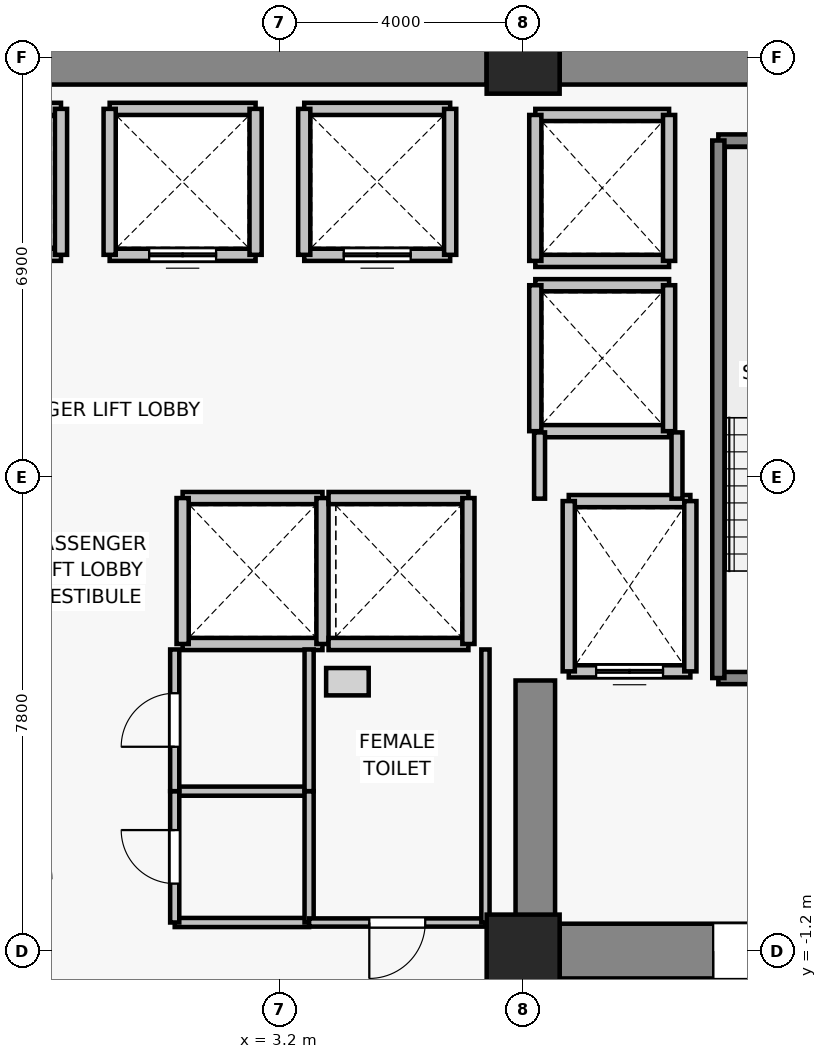
"""IFC4 building model, lengths in metres.
Left out: names, types, materials, properties, quantities, classifications, styles, units other than length and angle.
Written with IfcOpenShell. Run it as: python <this file> out.ifc"""

import sys

from ifc_helpers import new_model, si_unit, direction, frame, frame_2d, origin, origin_2d, place, context, subcontext, project, spatial, rectangle, extrude, source, transform, mapped, element, fill, save


model = new_model("IFC4")
c1 = context("Model", 3, precision=1e-05, world=origin(), true_north=direction((0.0, 1.0)))
c2 = subcontext(c1, "Body", "Model", "MODEL_VIEW")
j1 = project(units=[si_unit("LENGTHUNIT", "METRE"), si_unit("PLANEANGLEUNIT", "RADIAN")], contexts=[c1])
p1 = place(None, origin())
s1 = spatial("IfcSite", under=j1, at=p1, CompositionType="ELEMENT")
p2 = place(p1, origin())
s2 = spatial("IfcBuilding", under=s1, at=p2, CompositionType="ELEMENT")
p3 = place(p2, frame((0.0, 0.0, 70.3)))
s3 = spatial("IfcBuildingStorey", under=s2, at=p3, CompositionType="ELEMENT", Elevation=70.3)
for number, where, z_axis, x_axis in (
    (1, (7.2, -1.2, 0.0), (0.0, 0.0, 1.0), (1.0, 0.0, 0.0)),
    (2, (7.2, 13.5, 0.0), (0.0, 0.0, 1.0), (1.0, 0.0, 0.0)),
):
    element("IfcColumn", number, at=place(p3, frame(where, z_axis=z_axis, x_axis=x_axis)), inside=s3, PredefinedType="COLUMN", context=c2, shape_type="SweptSolid", body=[
        extrude(rectangle(XDim=1.2, YDim=1.2, at=origin_2d()), origin(), (0.0, 0.0, 1.0), 3.3),
    ])
p4 = place(p3, frame((-6.6, 13.5, 0.0), z_axis=(0.0, 0.0, 1.0), x_axis=(1.0, 0.0, 0.0)))
e3 = element("IfcWall", 3, at=p4, inside=s3, PredefinedType="SHEAR", context=c2, shape_type="SweptSolid", body=[
    extrude(rectangle(XDim=13.2, YDim=0.9, at=frame_2d((6.6, 0.0))), origin(), (0.0, 0.0, 1.0), 3.075),
])
p5 = place(p3, frame((7.8, 13.5, 0.0), z_axis=(0.0, 0.0, 1.0), x_axis=(1.0, 0.0, 0.0)))
e4 = element("IfcWall", 4, at=p5, inside=s3, PredefinedType="SHEAR", context=c2, shape_type="SweptSolid", body=[
    extrude(rectangle(XDim=6.0, YDim=0.9, at=frame_2d((3.0, 0.0))), origin(), (0.0, 0.0, 1.0), 3.075),
])
p6 = place(p3, frame((13.8, -1.2, 0.0), z_axis=(0.0, 0.0, 1.0), x_axis=(-1.0, 0.0, 0.0)))
e5 = element("IfcWall", 5, at=p6, inside=s3, PredefinedType="SHEAR", context=c2, shape_type="SweptSolid", body=[
    extrude(rectangle(XDim=6.0, YDim=0.9, at=frame_2d((3.0, 0.0))), origin(), (0.0, 0.0, 1.0), 3.075),
])
p7 = place(p6, frame((2.325, 0.0, 0.0)))
e6 = element("IfcOpeningElement", 6, at=p7, cuts=e5, PredefinedType="OPENING", context=c2, shape_type="SweptSolid", body=[
    extrude(rectangle(XDim=1.15, YDim=2.15, at=frame_2d((0.575, 1.075))), frame((0.0, 0.46, 0.0), z_axis=(0.0, -1.0, 0.0), x_axis=(1.0, 0.0, 0.0)), (0.0, 0.0, 1.0), 0.92),
])
p8 = place(p3, frame((7.4, -0.75, 0.0), z_axis=(0.0, 0.0, 1.0), x_axis=(0.0, 1.0, 0.0)))
e7 = element("IfcWall", 7, at=p8, inside=s3, PredefinedType="SHEAR", context=c2, shape_type="SweptSolid", body=[
    extrude(rectangle(XDim=4.0, YDim=0.65, at=frame_2d((2.0, 0.0))), origin(), (0.0, 0.0, 1.0), 3.075),
])
p9 = place(p3, frame((9.95, 3.4, 0.0), z_axis=(0.0, 0.0, 1.0), x_axis=(-1.0, 0.0, 0.0)))
e8 = element("IfcWall", 8, at=p9, inside=s3, PredefinedType="SOLIDWALL", context=c2, shape_type="SweptSolid", body=[
    extrude(rectangle(XDim=2.0, YDim=0.2, at=frame_2d((1.0, 0.0))), origin(), (0.0, 0.0, 1.0), 3.075),
])
p10 = place(p9, frame((0.45, 0.0, 0.0)))
e9 = element("IfcOpeningElement", 9, at=p10, cuts=e8, PredefinedType="OPENING", context=c2, shape_type="SweptSolid", body=[
    extrude(rectangle(XDim=1.1, YDim=2.2, at=frame_2d((0.55, 1.1))), frame((0.0, 0.11, 0.0), z_axis=(0.0, -1.0, 0.0), x_axis=(1.0, 0.0, 0.0)), (0.0, 0.0, 1.0), 0.22),
])
p11 = place(p3, frame((7.95, 6.2, 0.0), z_axis=(0.0, 0.0, 1.0), x_axis=(1.0, 0.0, 0.0)))
e10 = element("IfcWall", 10, at=p11, inside=s3, PredefinedType="SOLIDWALL", context=c2, shape_type="SweptSolid", body=[
    extrude(rectangle(XDim=2.0, YDim=0.2, at=frame_2d((1.0, 0.0))), origin(), (0.0, 0.0, 1.0), 3.075),
])
for number, where, z_axis, x_axis in (
    (11, (7.95, 3.4, 0.0), (0.0, 0.0, 1.0), (0.0, 1.0, 0.0)),
    (12, (9.95, 6.2, 0.0), (0.0, 0.0, 1.0), (0.0, -1.0, 0.0)),
):
    element("IfcWall", number, at=place(p3, frame(where, z_axis=z_axis, x_axis=x_axis)), inside=s3, PredefinedType="SOLIDWALL", context=c2, shape_type="SweptSolid", body=[
        extrude(rectangle(XDim=2.8, YDim=0.2, at=frame_2d((1.4, 0.0))), origin(), (0.0, 0.0, 1.0), 3.075),
    ])
p12 = place(p3, frame((-0.4, 10.25, 0.0), z_axis=(0.0, 0.0, 1.0), x_axis=(-1.0, 0.0, 0.0)))
e13 = element("IfcWall", 13, at=p12, inside=s3, PredefinedType="SOLIDWALL", context=c2, shape_type="SweptSolid", body=[
    extrude(rectangle(XDim=2.4, YDim=0.2, at=frame_2d((1.2, 0.0))), origin(), (0.0, 0.0, 1.0), 3.075),
])
p13 = place(p12, frame((0.65, 0.0, 0.0)))
e14 = element("IfcOpeningElement", 14, at=p13, cuts=e13, PredefinedType="OPENING", context=c2, shape_type="SweptSolid", body=[
    extrude(rectangle(XDim=1.1, YDim=2.2, at=frame_2d((0.55, 1.1))), frame((0.0, 0.11, 0.0), z_axis=(0.0, -1.0, 0.0), x_axis=(1.0, 0.0, 0.0)), (0.0, 0.0, 1.0), 0.22),
])
p14 = place(p3, frame((-2.8, 12.65, 0.0), z_axis=(0.0, 0.0, 1.0), x_axis=(1.0, 0.0, 0.0)))
e15 = element("IfcWall", 15, at=p14, inside=s3, PredefinedType="SOLIDWALL", context=c2, shape_type="SweptSolid", body=[
    extrude(rectangle(XDim=2.4, YDim=0.2, at=frame_2d((1.2, 0.0))), origin(), (0.0, 0.0, 1.0), 3.075),
])
p15 = place(p3, frame((-0.4, 12.65, 0.0), z_axis=(0.0, 0.0, 1.0), x_axis=(0.0, -1.0, 0.0)))
e16 = element("IfcWall", 16, at=p15, inside=s3, PredefinedType="SOLIDWALL", context=c2, shape_type="SweptSolid", body=[
    extrude(rectangle(XDim=2.4, YDim=0.2, at=frame_2d((1.2, 0.0))), origin(), (0.0, 0.0, 1.0), 3.075),
])
p16 = place(p3, frame((2.8, 10.25, 0.0), z_axis=(0.0, 0.0, 1.0), x_axis=(-1.0, 0.0, 0.0)))
e17 = element("IfcWall", 17, at=p16, inside=s3, PredefinedType="SOLIDWALL", context=c2, shape_type="SweptSolid", body=[
    extrude(rectangle(XDim=2.4, YDim=0.2, at=frame_2d((1.2, 0.0))), origin(), (0.0, 0.0, 1.0), 3.075),
])
p17 = place(p16, frame((0.65, 0.0, 0.0)))
e18 = element("IfcOpeningElement", 18, at=p17, cuts=e17, PredefinedType="OPENING", context=c2, shape_type="SweptSolid", body=[
    extrude(rectangle(XDim=1.1, YDim=2.2, at=frame_2d((0.55, 1.1))), frame((0.0, 0.11, 0.0), z_axis=(0.0, -1.0, 0.0), x_axis=(1.0, 0.0, 0.0)), (0.0, 0.0, 1.0), 0.22),
])
p18 = place(p3, frame((0.4, 12.65, 0.0), z_axis=(0.0, 0.0, 1.0), x_axis=(1.0, 0.0, 0.0)))
e19 = element("IfcWall", 19, at=p18, inside=s3, PredefinedType="SOLIDWALL", context=c2, shape_type="SweptSolid", body=[
    extrude(rectangle(XDim=2.4, YDim=0.2, at=frame_2d((1.2, 0.0))), origin(), (0.0, 0.0, 1.0), 3.075),
])
for number, where, z_axis, x_axis in (
    (20, (0.4, 10.25, 0.0), (0.0, 0.0, 1.0), (0.0, 1.0, 0.0)),
    (21, (2.8, 12.65, 0.0), (0.0, 0.0, 1.0), (0.0, -1.0, 0.0)),
):
    element("IfcWall", number, at=place(p3, frame(where, z_axis=z_axis, x_axis=x_axis)), inside=s3, PredefinedType="SOLIDWALL", context=c2, shape_type="SweptSolid", body=[
        extrude(rectangle(XDim=2.4, YDim=0.2, at=frame_2d((1.2, 0.0))), origin(), (0.0, 0.0, 1.0), 3.075),
    ])
p19 = place(p3, frame((6.0, 10.25, 0.0), z_axis=(0.0, 0.0, 1.0), x_axis=(-1.0, 0.0, 0.0)))
e22 = element("IfcWall", 22, at=p19, inside=s3, PredefinedType="SOLIDWALL", context=c2, shape_type="SweptSolid", body=[
    extrude(rectangle(XDim=2.4, YDim=0.2, at=frame_2d((1.2, 0.0))), origin(), (0.0, 0.0, 1.0), 3.075),
])
p20 = place(p19, frame((0.65, 0.0, 0.0)))
e23 = element("IfcOpeningElement", 23, at=p20, cuts=e22, PredefinedType="OPENING", context=c2, shape_type="SweptSolid", body=[
    extrude(rectangle(XDim=1.1, YDim=2.2, at=frame_2d((0.55, 1.1))), frame((0.0, 0.11, 0.0), z_axis=(0.0, -1.0, 0.0), x_axis=(1.0, 0.0, 0.0)), (0.0, 0.0, 1.0), 0.22),
])
for number, where, z_axis, x_axis in (
    (24, (3.6, 12.65, 0.0), (0.0, 0.0, 1.0), (1.0, 0.0, 0.0)),
    (25, (3.6, 10.25, 0.0), (0.0, 0.0, 1.0), (0.0, 1.0, 0.0)),
    (26, (6.0, 12.65, 0.0), (0.0, 0.0, 1.0), (0.0, -1.0, 0.0)),
):
    element("IfcWall", number, at=place(p3, frame(where, z_axis=z_axis, x_axis=x_axis)), inside=s3, PredefinedType="SOLIDWALL", context=c2, shape_type="SweptSolid", body=[
        extrude(rectangle(XDim=2.4, YDim=0.2, at=frame_2d((1.2, 0.0))), origin(), (0.0, 0.0, 1.0), 3.075),
    ])
for number, where, z_axis, x_axis in (
    (27, (3.9, 3.85, 0.0), (0.0, 0.0, 1.0), (-1.0, 0.0, 0.0)),
    (28, (1.6, 6.25, 0.0), (0.0, 0.0, 1.0), (1.0, 0.0, 0.0)),
):
    element("IfcWall", number, at=place(p3, frame(where, z_axis=z_axis, x_axis=x_axis)), inside=s3, PredefinedType="SOLIDWALL", context=c2, shape_type="SweptSolid", body=[
        extrude(rectangle(XDim=2.3, YDim=0.2, at=frame_2d((1.15, 0.0))), origin(), (0.0, 0.0, 1.0), 3.075),
    ])
for number, where, z_axis, x_axis in (
    (29, (1.6, 3.85, 0.0), (0.0, 0.0, 1.0), (0.0, 1.0, 0.0)),
    (30, (3.9, 6.25, 0.0), (0.0, 0.0, 1.0), (0.0, -1.0, 0.0)),
):
    element("IfcWall", number, at=place(p3, frame(where, z_axis=z_axis, x_axis=x_axis)), inside=s3, PredefinedType="SOLIDWALL", context=c2, shape_type="SweptSolid", body=[
        extrude(rectangle(XDim=2.4, YDim=0.2, at=frame_2d((1.2, 0.0))), origin(), (0.0, 0.0, 1.0), 3.075),
    ])
for number, where, z_axis, x_axis in (
    (31, (6.3, 3.85, 0.0), (0.0, 0.0, 1.0), (-1.0, 0.0, 0.0)),
    (32, (4.0, 6.25, 0.0), (0.0, 0.0, 1.0), (1.0, 0.0, 0.0)),
):
    element("IfcWall", number, at=place(p3, frame(where, z_axis=z_axis, x_axis=x_axis)), inside=s3, PredefinedType="SOLIDWALL", context=c2, shape_type="SweptSolid", body=[
        extrude(rectangle(XDim=2.3, YDim=0.2, at=frame_2d((1.15, 0.0))), origin(), (0.0, 0.0, 1.0), 3.075),
    ])
p21 = place(p3, frame((6.3, 6.25, 0.0), z_axis=(0.0, 0.0, 1.0), x_axis=(0.0, -1.0, 0.0)))
e33 = element("IfcWall", 33, at=p21, inside=s3, PredefinedType="SOLIDWALL", context=c2, shape_type="SweptSolid", body=[
    extrude(rectangle(XDim=2.4, YDim=0.2, at=frame_2d((1.2, 0.0))), origin(), (0.0, 0.0, 1.0), 3.075),
])
for number, where, z_axis, x_axis in (
    (34, (9.6, 7.35, 0.0), (0.0, 0.0, 1.0), (-1.0, 0.0, 0.0)),
    (35, (7.4, 9.75, 0.0), (0.0, 0.0, 1.0), (1.0, 0.0, 0.0)),
):
    element("IfcWall", number, at=place(p3, frame(where, z_axis=z_axis, x_axis=x_axis)), inside=s3, PredefinedType="SOLIDWALL", context=c2, shape_type="SweptSolid", body=[
        extrude(rectangle(XDim=2.2, YDim=0.2, at=frame_2d((1.1, 0.0))), origin(), (0.0, 0.0, 1.0), 2.465),
    ])
p22 = place(p3, frame((7.4, 7.35, 0.0), z_axis=(0.0, 0.0, 1.0), x_axis=(0.0, 1.0, 0.0)))
e36 = element("IfcWall", 36, at=p22, inside=s3, PredefinedType="SOLIDWALL", context=c2, shape_type="SweptSolid", body=[
    extrude(rectangle(XDim=2.4, YDim=0.2, at=frame_2d((1.2, 0.0))), origin(), (0.0, 0.0, 1.0), 2.465),
])
p23 = place(p3, frame((9.6, 9.75, 0.0), z_axis=(0.0, 0.0, 1.0), x_axis=(0.0, -1.0, 0.0)))
e37 = element("IfcWall", 37, at=p23, inside=s3, PredefinedType="SOLIDWALL", context=c2, shape_type="SweptSolid", body=[
    extrude(rectangle(XDim=2.4, YDim=0.2, at=frame_2d((1.2, 0.0))), origin(), (0.0, 0.0, 1.0), 3.075),
])
for number, where, z_axis, x_axis in (
    (38, (9.6, 10.15, 0.0), (0.0, 0.0, 1.0), (-1.0, 0.0, 0.0)),
    (39, (7.4, 12.55, 0.0), (0.0, 0.0, 1.0), (1.0, 0.0, 0.0)),
):
    element("IfcWall", number, at=place(p3, frame(where, z_axis=z_axis, x_axis=x_axis)), inside=s3, PredefinedType="SOLIDWALL", context=c2, shape_type="SweptSolid", body=[
        extrude(rectangle(XDim=2.2, YDim=0.2, at=frame_2d((1.1, 0.0))), origin(), (0.0, 0.0, 1.0), 2.465),
    ])
p24 = place(p3, frame((7.4, 10.15, 0.0), z_axis=(0.0, 0.0, 1.0), x_axis=(0.0, 1.0, 0.0)))
e40 = element("IfcWall", 40, at=p24, inside=s3, PredefinedType="SOLIDWALL", context=c2, shape_type="SweptSolid", body=[
    extrude(rectangle(XDim=2.4, YDim=0.2, at=frame_2d((1.2, 0.0))), origin(), (0.0, 0.0, 1.0), 2.465),
])
p25 = place(p3, frame((9.6, 12.55, 0.0), z_axis=(0.0, 0.0, 1.0), x_axis=(0.0, -1.0, 0.0)))
e41 = element("IfcWall", 41, at=p25, inside=s3, PredefinedType="SOLIDWALL", context=c2, shape_type="SweptSolid", body=[
    extrude(rectangle(XDim=2.4, YDim=0.2, at=frame_2d((1.2, 0.0))), origin(), (0.0, 0.0, 1.0), 3.075),
])
p26 = place(p3, frame((13.93, 3.29, 0.0), z_axis=(0.0, 0.0, 1.0), x_axis=(-1.0, 0.0, 0.0)))
e42 = element("IfcWall", 42, at=p26, inside=s3, PredefinedType="SOLIDWALL", context=c2, shape_type="SweptSolid", body=[
    extrude(rectangle(XDim=3.52, YDim=0.2, at=frame_2d((1.76, 0.0))), origin(), (0.0, 0.0, 1.0), 3.075),
])
p27 = place(p26, frame((1.205, 0.0, 0.0)))
e43 = element("IfcOpeningElement", 43, at=p27, cuts=e42, PredefinedType="OPENING", context=c2, shape_type="SweptSolid", body=[
    extrude(rectangle(XDim=1.15, YDim=2.15, at=frame_2d((0.575, 1.075))), frame((0.0, 0.11, 0.0), z_axis=(0.0, -1.0, 0.0), x_axis=(1.0, 0.0, 0.0)), (0.0, 0.0, 1.0), 0.22),
])
p28 = place(p3, frame((10.41, 12.13, 0.0), z_axis=(0.0, 0.0, 1.0), x_axis=(1.0, 0.0, 0.0)))
e44 = element("IfcWall", 44, at=p28, inside=s3, PredefinedType="SOLIDWALL", context=c2, shape_type="SweptSolid", body=[
    extrude(rectangle(XDim=3.52, YDim=0.2, at=frame_2d((1.76, 0.0))), origin(), (0.0, 0.0, 1.0), 3.075),
])
p29 = place(p3, frame((10.41, 3.29, 0.0), z_axis=(0.0, 0.0, 1.0), x_axis=(0.0, 1.0, 0.0)))
e45 = element("IfcWall", 45, at=p29, inside=s3, PredefinedType="SOLIDWALL", context=c2, shape_type="SweptSolid", body=[
    extrude(rectangle(XDim=8.84, YDim=0.2, at=frame_2d((4.42, 0.0))), origin(), (0.0, 0.0, 1.0), 3.075),
])
p30 = place(p3, frame((7.47, 6.24, 0.0), z_axis=(0.0, 0.0, 1.0), x_axis=(0.0, 1.0, 0.0)))
e46 = element("IfcWall", 46, at=p30, inside=s3, PredefinedType="PARTITIONING", context=c2, shape_type="SweptSolid", body=[
    extrude(rectangle(XDim=1.09, YDim=0.18, at=frame_2d((0.545, 0.0))), origin(), (0.0, 0.0, 1.0), 2.465),
])
p31 = place(p3, frame((9.73, 7.33, 0.0), z_axis=(0.0, 0.0, 1.0), x_axis=(0.0, -1.0, 0.0)))
e47 = element("IfcWall", 47, at=p31, inside=s3, PredefinedType="PARTITIONING", context=c2, shape_type="SweptSolid", body=[
    extrude(rectangle(XDim=1.09, YDim=0.18, at=frame_2d((0.545, 0.0))), origin(), (0.0, 0.0, 1.0), 3.075),
])
for number, where, z_axis, x_axis in (
    (48, (3.68, -0.73, 0.0), (0.0, 0.0, 1.0), (-1.0, 0.0, 0.0)),
    (49, (1.47, 1.43, 0.0), (0.0, 0.0, 1.0), (1.0, 0.0, 0.0)),
):
    element("IfcWall", number, at=place(p3, frame(where, z_axis=z_axis, x_axis=x_axis)), inside=s3, PredefinedType="PARTITIONING", context=c2, shape_type="SweptSolid", body=[
        extrude(rectangle(XDim=2.21, YDim=0.15, at=frame_2d((1.105, 0.0))), origin(), (0.0, 0.0, 1.0), 3.075),
    ])
p32 = place(p3, frame((1.47, -0.73, 0.0), z_axis=(0.0, 0.0, 1.0), x_axis=(0.0, 1.0, 0.0)))
e50 = element("IfcWall", 50, at=p32, inside=s3, PredefinedType="PARTITIONING", context=c2, shape_type="SweptSolid", body=[
    extrude(rectangle(XDim=2.16, YDim=0.15, at=frame_2d((1.08, 0.0))), origin(), (0.0, 0.0, 1.0), 3.075),
])
p33 = place(p32, frame((0.64, 0.0, 0.0)))
e51 = element("IfcOpeningElement", 51, at=p33, cuts=e50, PredefinedType="OPENING", context=c2, shape_type="SweptSolid", body=[
    extrude(rectangle(XDim=0.88, YDim=2.1, at=frame_2d((0.44, 1.05))), frame((0.0, 0.085, 0.0), z_axis=(0.0, -1.0, 0.0), x_axis=(1.0, 0.0, 0.0)), (0.0, 0.0, 1.0), 0.17),
])
p34 = place(p3, frame((3.68, 1.43, 0.0), z_axis=(0.0, 0.0, 1.0), x_axis=(0.0, -1.0, 0.0)))
e52 = element("IfcWall", 52, at=p34, inside=s3, PredefinedType="PARTITIONING", context=c2, shape_type="SweptSolid", body=[
    extrude(rectangle(XDim=2.16, YDim=0.15, at=frame_2d((1.08, 0.0))), origin(), (0.0, 0.0, 1.0), 3.075),
])
p35 = place(p3, frame((1.47, 1.43, 0.0), z_axis=(0.0, 0.0, 1.0), x_axis=(0.0, 1.0, 0.0)))
e53 = element("IfcWall", 53, at=p35, inside=s3, PredefinedType="PARTITIONING", context=c2, shape_type="SweptSolid", body=[
    extrude(rectangle(XDim=2.33, YDim=0.15, at=frame_2d((1.165, 0.0))), origin(), (0.0, 0.0, 1.0), 3.075),
])
p36 = place(p35, frame((0.73, 0.0, 0.0)))
e54 = element("IfcOpeningElement", 54, at=p36, cuts=e53, PredefinedType="OPENING", context=c2, shape_type="SweptSolid", body=[
    extrude(rectangle(XDim=0.88, YDim=2.15, at=frame_2d((0.44, 1.075))), frame((0.0, 0.085, 0.0), z_axis=(0.0, -1.0, 0.0), x_axis=(1.0, 0.0, 0.0)), (0.0, 0.0, 1.0), 0.17),
])
p37 = place(p3, frame((3.68, 3.76, 0.0), z_axis=(0.0, 0.0, 1.0), x_axis=(0.0, -1.0, 0.0)))
e55 = element("IfcWall", 55, at=p37, inside=s3, PredefinedType="PARTITIONING", context=c2, shape_type="SweptSolid", body=[
    extrude(rectangle(XDim=2.33, YDim=0.15, at=frame_2d((1.165, 0.0))), origin(), (0.0, 0.0, 1.0), 3.075),
])
p38 = place(p3, frame((6.58, -0.73, 0.0), z_axis=(0.0, 0.0, 1.0), x_axis=(-1.0, 0.0, 0.0)))
e56 = element("IfcWall", 56, at=p38, inside=s3, PredefinedType="PARTITIONING", context=c2, shape_type="SweptSolid", body=[
    extrude(rectangle(XDim=2.9, YDim=0.135, at=frame_2d((1.45, 0.0))), origin(), (0.0, 0.0, 1.0), 3.075),
])
p39 = place(p38, frame((0.99, 0.0, 0.0)))
e57 = element("IfcOpeningElement", 57, at=p39, cuts=e56, PredefinedType="OPENING", context=c2, shape_type="SweptSolid", body=[
    extrude(rectangle(XDim=0.92, YDim=2.1, at=frame_2d((0.46, 1.05))), frame((0.0, 0.077, 0.0), z_axis=(0.0, -1.0, 0.0), x_axis=(1.0, 0.0, 0.0)), (0.0, 0.0, 1.0), 0.155),
])
p40 = place(p3, frame((6.58, 3.76, 0.0), z_axis=(0.0, 0.0, 1.0), x_axis=(0.0, -1.0, 0.0)))
e58 = element("IfcWall", 58, at=p40, inside=s3, PredefinedType="PARTITIONING", context=c2, shape_type="SweptSolid", body=[
    extrude(rectangle(XDim=4.49, YDim=0.135, at=frame_2d((2.245, 0.0))), origin(), (0.0, 0.0, 1.0), 3.075),
])
m1 = source(origin(), c2, "Body", "SweptSolid", [
    extrude(rectangle(XDim=1.1, YDim=2.2, at=frame_2d((0.55, 1.1))), frame((0.0, 0.025, 0.0), z_axis=(0.0, -1.0, 0.0), x_axis=(1.0, 0.0, 0.0)), (0.0, 0.0, 1.0), 0.05),
])
p41 = place(p10, origin())
e59 = element("IfcDoor", 59, at=p41, inside=s3, OperationType="DOUBLE_DOOR_SLIDING", PredefinedType="DOOR", context=c2, shape_type="MappedRepresentation", body=[
    mapped(m1, transform((0.0, 0.0, 0.0), x_axis=(1.0, 0.0, 0.0), y_axis=(0.0, 1.0, 0.0), z_axis=(0.0, 0.0, 1.0), scale=1.0)),
])
fill(e9, e59)
p42 = place(p17, origin())
e60 = element("IfcDoor", 60, at=p42, inside=s3, OperationType="DOUBLE_DOOR_SLIDING", PredefinedType="DOOR", context=c2, shape_type="MappedRepresentation", body=[
    mapped(m1, transform((0.0, 0.0, 0.0), x_axis=(1.0, 0.0, 0.0), y_axis=(0.0, 1.0, 0.0), z_axis=(0.0, 0.0, 1.0), scale=1.0)),
])
fill(e18, e60)
p43 = place(p20, origin())
e61 = element("IfcDoor", 61, at=p43, inside=s3, OperationType="DOUBLE_DOOR_SLIDING", PredefinedType="DOOR", context=c2, shape_type="MappedRepresentation", body=[
    mapped(m1, transform((0.0, 0.0, 0.0), x_axis=(1.0, 0.0, 0.0), y_axis=(0.0, 1.0, 0.0), z_axis=(0.0, 0.0, 1.0), scale=1.0)),
])
fill(e23, e61)
m2 = source(origin(), c2, "Body", "SweptSolid", [
    extrude(rectangle(XDim=1.15, YDim=2.15, at=frame_2d((0.575, 1.075))), frame((0.0, 0.025, 0.0), z_axis=(0.0, -1.0, 0.0), x_axis=(1.0, 0.0, 0.0)), (0.0, 0.0, 1.0), 0.05),
])
p44 = place(p7, origin())
e62 = element("IfcDoor", 62, at=p44, inside=s3, OperationType="SINGLE_SWING_RIGHT", PredefinedType="DOOR", context=c2, shape_type="MappedRepresentation", body=[
    mapped(m2, transform((0.0, 0.0, 0.0), x_axis=(1.0, 0.0, 0.0), y_axis=(0.0, 1.0, 0.0), z_axis=(0.0, 0.0, 1.0), scale=1.0)),
])
fill(e6, e62)
m3 = source(origin(), c2, "Body", "SweptSolid", [
    extrude(rectangle(XDim=0.88, YDim=2.1, at=frame_2d((0.44, 1.05))), frame((0.0, 0.025, 0.0), z_axis=(0.0, -1.0, 0.0), x_axis=(1.0, 0.0, 0.0)), (0.0, 0.0, 1.0), 0.05),
])
p45 = place(p33, origin())
e63 = element("IfcDoor", 63, at=p45, inside=s3, OperationType="SINGLE_SWING_RIGHT", PredefinedType="DOOR", context=c2, shape_type="MappedRepresentation", body=[
    mapped(m3, transform((0.0, 0.0, 0.0), x_axis=(1.0, 0.0, 0.0), y_axis=(0.0, 1.0, 0.0), z_axis=(0.0, 0.0, 1.0), scale=1.0)),
])
fill(e51, e63)
m4 = source(origin(), c2, "Body", "SweptSolid", [
    extrude(rectangle(XDim=0.88, YDim=2.15, at=frame_2d((0.44, 1.075))), frame((0.0, 0.025, 0.0), z_axis=(0.0, -1.0, 0.0), x_axis=(1.0, 0.0, 0.0)), (0.0, 0.0, 1.0), 0.05),
])
p46 = place(p36, origin())
e64 = element("IfcDoor", 64, at=p46, inside=s3, OperationType="SINGLE_SWING_LEFT", PredefinedType="DOOR", context=c2, shape_type="MappedRepresentation", body=[
    mapped(m4, transform((0.0, 0.0, 0.0), x_axis=(1.0, 0.0, 0.0), y_axis=(0.0, 1.0, 0.0), z_axis=(0.0, 0.0, 1.0), scale=1.0)),
])
fill(e54, e64)
m5 = source(origin(), c2, "Body", "SweptSolid", [
    extrude(rectangle(XDim=0.92, YDim=2.1, at=frame_2d((0.46, 1.05))), frame((0.0, 0.025, 0.0), z_axis=(0.0, -1.0, 0.0), x_axis=(1.0, 0.0, 0.0)), (0.0, 0.0, 1.0), 0.05),
])
p47 = place(p39, origin())
e65 = element("IfcDoor", 65, at=p47, inside=s3, OperationType="SINGLE_SWING_RIGHT", PredefinedType="DOOR", context=c2, shape_type="MappedRepresentation", body=[
    mapped(m5, transform((0.0, 0.0, 0.0), x_axis=(1.0, 0.0, 0.0), y_axis=(0.0, 1.0, 0.0), z_axis=(0.0, 0.0, 1.0), scale=1.0)),
])
fill(e57, e65)
save(model, sys.argv[1])
